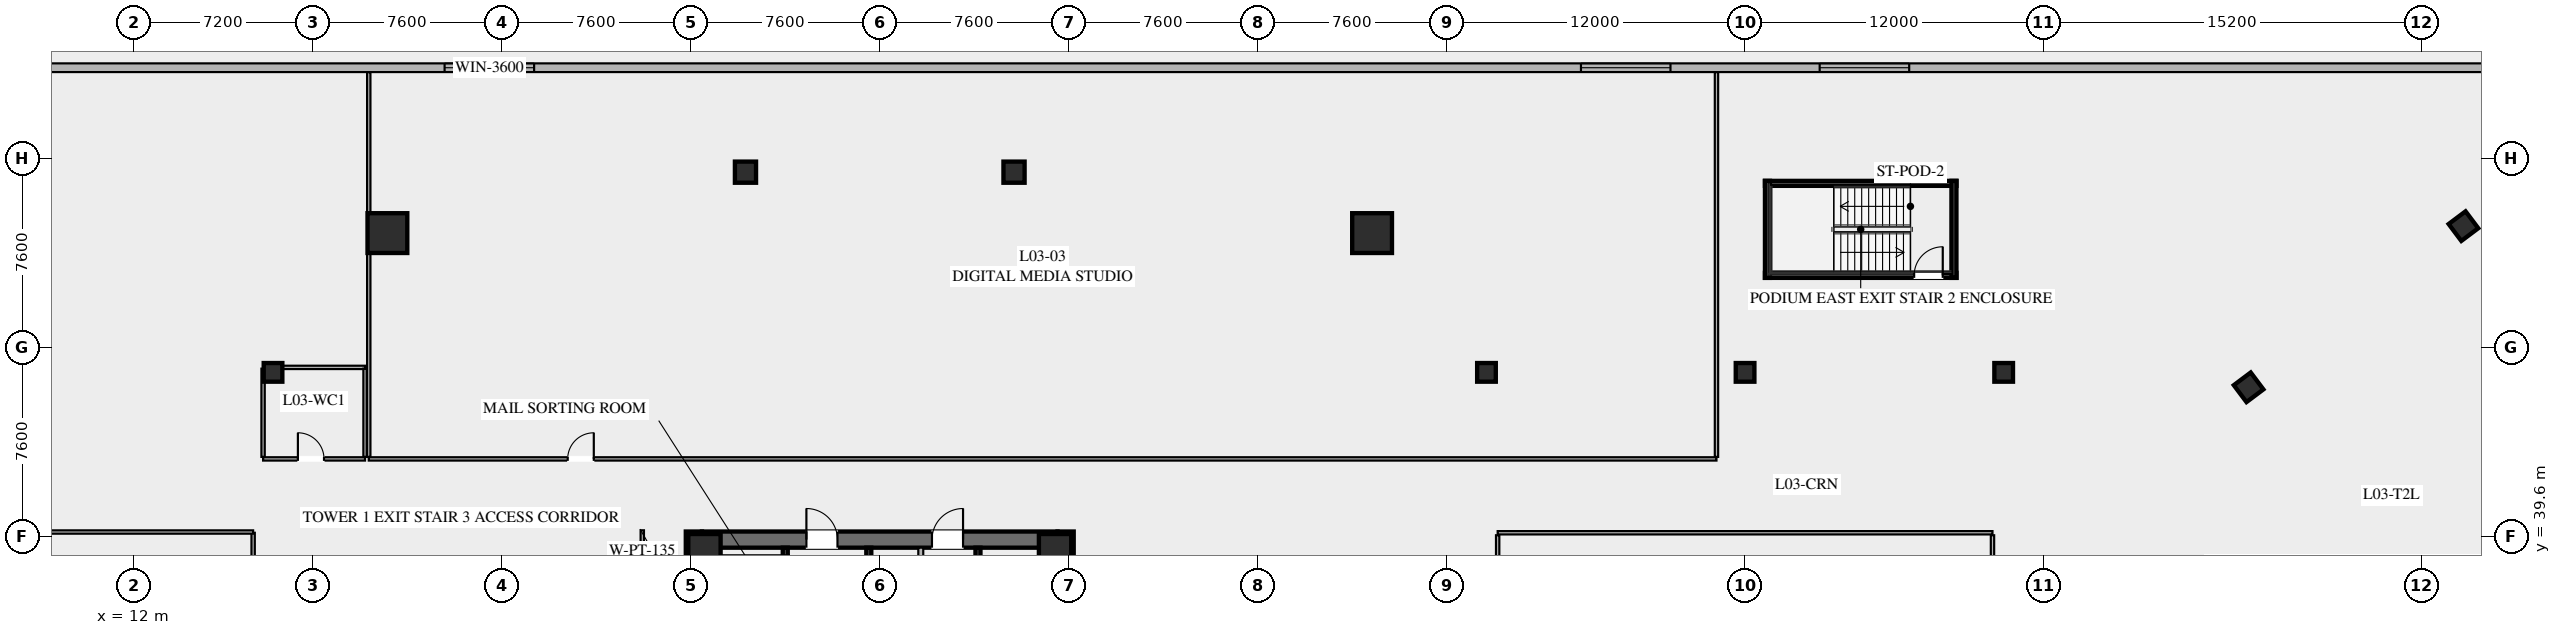
"""IFC4 building model, lengths in metres.
Left out: names, types, materials, properties, quantities, classifications, styles, units other than length and angle.
Written with IfcOpenShell. Run it as: python <this file> out.ifc"""

import sys

from ifc_helpers import new_model, si_unit, direction, frame, frame_2d, origin, origin_2d, place, context, subcontext, project, spatial, rectangle, hollow_rectangle, extrude, element, fill, save


model = new_model("IFC4")
c1 = context("Model", 3, precision=1e-05, world=origin(), true_north=direction((0.0, 1.0)))
c2 = subcontext(c1, "Body", "Model", "MODEL_VIEW")
j1 = project(units=[si_unit("LENGTHUNIT", "METRE"), si_unit("PLANEANGLEUNIT", "RADIAN")], contexts=[c1])
p1 = place(None, origin())
s1 = spatial("IfcSite", under=j1, at=p1, CompositionType="ELEMENT")
p2 = place(p1, origin())
s2 = spatial("IfcBuilding", under=s1, at=p2, CompositionType="ELEMENT")
p3 = place(p2, frame((0.0, 0.0, 15.6)))
s3 = spatial("IfcBuildingStorey", under=s2, at=p3, CompositionType="ELEMENT", Elevation=15.6)
for number, where, z_axis, x_axis in (
    (1, (34.525, 24.2, 0.0), (0.0, 0.0, 1.0), (0.0, 1.0, 0.0)),
    (2, (49.475, 39.8, 0.0), (0.0, 0.0, 1.0), (0.0, -1.0, 0.0)),
):
    element("IfcWall", number, at=place(p3, frame(where, z_axis=z_axis, x_axis=x_axis)), inside=s3, PredefinedType="SHEAR", context=c2, shape_type="SweptSolid", body=[
        extrude(rectangle(XDim=15.6, YDim=0.65, at=frame_2d((7.8, 0.0))), origin(), (0.0, 0.0, 1.0), 4.2),
    ])
p4 = place(p3, frame((34.85, 39.475, 0.0), z_axis=(0.0, 0.0, 1.0), x_axis=(1.0, 0.0, 0.0)))
e3 = element("IfcWall", 3, at=p4, inside=s3, PredefinedType="SHEAR", context=c2, shape_type="SweptSolid", body=[
    extrude(rectangle(XDim=14.3, YDim=0.65, at=frame_2d((7.15, 0.0))), origin(), (0.0, 0.0, 1.0), 4.2),
])
p5 = place(p4, frame((4.2, 0.0, 0.0)))
e4 = element("IfcOpeningElement", 4, at=p5, cuts=e3, PredefinedType="OPENING", context=c2, shape_type="SweptSolid", body=[
    extrude(rectangle(XDim=1.25, YDim=2.25, at=frame_2d((0.625, 1.125))), frame((0.0, 0.335, 0.0), z_axis=(0.0, -1.0, 0.0), x_axis=(1.0, 0.0, 0.0)), (0.0, 0.0, 1.0), 0.67),
])
p6 = place(p4, frame((9.25, 0.0, 0.0)))
e5 = element("IfcOpeningElement", 5, at=p6, cuts=e3, PredefinedType="OPENING", context=c2, shape_type="SweptSolid", body=[
    extrude(rectangle(XDim=1.25, YDim=2.25, at=frame_2d((0.625, 1.125))), frame((0.0, 0.335, 0.0), z_axis=(0.0, -1.0, 0.0), x_axis=(1.0, 0.0, 0.0)), (0.0, 0.0, 1.0), 0.67),
])
for number, where, z_axis, x_axis in (
    (6, (49.05, 39.05, 0.0), (0.0, 0.0, 1.0), (1.0, 0.0, 0.0)),
    (7, (34.95, 39.05, 0.0), (0.0, 0.0, 1.0), (1.0, 0.0, 0.0)),
):
    element("IfcColumn", number, at=place(p3, frame(where, z_axis=z_axis, x_axis=x_axis)), inside=s3, PredefinedType="COLUMN", context=c2, shape_type="SweptSolid", body=[
        extrude(hollow_rectangle(XDim=1.3, YDim=1.3, WallThickness=0.05, at=origin_2d()), origin(), (0.0, 0.0, 1.0), 3.9),
    ])
for number, where, z_axis, x_axis in (
    (8, (61.8, 51.8, 0.0), (0.0, 0.0, 1.0), (1.0, 0.0, 0.0)),
    (9, (22.2, 51.8, 0.0), (0.0, 0.0, 1.0), (1.0, 0.0, 0.0)),
):
    element("IfcColumn", number, at=place(p3, frame(where, z_axis=z_axis, x_axis=x_axis)), inside=s3, PredefinedType="COLUMN", context=c2, shape_type="SweptSolid", body=[
        extrude(hollow_rectangle(XDim=1.6, YDim=1.6, WallThickness=0.06, at=origin_2d()), origin(), (0.0, 0.0, 1.0), 3.9),
    ])
for number, where, z_axis, x_axis in (
    (10, (47.4, 54.25, 0.0), (0.0, 0.0, 1.0), (1.0, 0.0, 0.0)),
    (11, (36.6, 54.25, 0.0), (0.0, 0.0, 1.0), (1.0, 0.0, 0.0)),
):
    element("IfcColumn", number, at=place(p3, frame(where, z_axis=z_axis, x_axis=x_axis)), inside=s3, PredefinedType="COLUMN", context=c2, shape_type="SweptSolid", body=[
        extrude(hollow_rectangle(XDim=0.85, YDim=0.85, WallThickness=0.035, at=origin_2d()), origin(), (0.0, 0.0, 1.0), 3.9),
    ])
p7 = place(p3, frame((103.571, 33.522, 0.0), z_axis=(0.0, 0.0, 1.0), x_axis=(0.799998028465, 0.600002628705, 0.0)))
e12 = element("IfcWall", 12, at=p7, inside=s3, PredefinedType="SHEAR", context=c2, shape_type="SweptSolid", body=[
    extrude(rectangle(XDim=14.86, YDim=0.65, at=frame_2d((7.43, 0.0))), origin(), (0.0, 0.0, 1.0), 4.2),
])
p8 = place(p7, frame((4.48, 0.0, 0.0)))
e13 = element("IfcOpeningElement", 13, at=p8, cuts=e12, PredefinedType="OPENING", context=c2, shape_type="SweptSolid", body=[
    extrude(rectangle(XDim=1.25, YDim=2.25, at=frame_2d((0.625, 1.125))), frame((0.0, 0.335, 0.0), z_axis=(0.0, -1.0, 0.0), x_axis=(1.0, 0.0, 0.0)), (0.0, 0.0, 1.0), 0.67),
])
p9 = place(p7, frame((9.53, 0.0, 0.0)))
e14 = element("IfcOpeningElement", 14, at=p9, cuts=e12, PredefinedType="OPENING", context=c2, shape_type="SweptSolid", body=[
    extrude(rectangle(XDim=1.25, YDim=2.25, at=frame_2d((0.625, 1.125))), frame((0.0, 0.335, 0.0), z_axis=(0.0, -1.0, 0.0), x_axis=(1.0, 0.0, 0.0)), (0.0, 0.0, 1.0), 0.67),
])
for number, where, z_axis, x_axis in (
    (15, (105.69, 52.08, 0.0), (0.0, 0.0, 1.0), (0.8, 0.6, 0.0)),
    (16, (97.05, 45.6, 0.0), (0.0, 0.0, 1.0), (0.8, 0.6, 0.0)),
):
    element("IfcColumn", number, at=place(p3, frame(where, z_axis=z_axis, x_axis=x_axis)), inside=s3, PredefinedType="COLUMN", context=c2, shape_type="SweptSolid", body=[
        extrude(hollow_rectangle(XDim=0.85, YDim=0.85, WallThickness=0.035, at=origin_2d()), origin(), (0.0, 0.0, 1.0), 3.9),
    ])
for number, where, z_axis, x_axis in (
    (17, (17.6, 46.2, 0.0), (0.0, 0.0, 1.0), (1.0, 0.0, 0.0)),
    (18, (66.4, 46.2, 0.0), (0.0, 0.0, 1.0), (1.0, 0.0, 0.0)),
    (19, (76.8, 46.2, 0.0), (0.0, 0.0, 1.0), (1.0, 0.0, 0.0)),
    (20, (87.2, 46.2, 0.0), (0.0, 0.0, 1.0), (1.0, 0.0, 0.0)),
):
    element("IfcColumn", number, at=place(p3, frame(where, z_axis=z_axis, x_axis=x_axis)), inside=s3, PredefinedType="COLUMN", context=c2, shape_type="SweptSolid", body=[
        extrude(rectangle(XDim=0.75, YDim=0.75, at=origin_2d()), origin(), (0.0, 0.0, 1.0), 3.9),
    ])
p10 = place(p3, frame((5.55, 58.45, 0.0), z_axis=(0.0, 0.0, 1.0), x_axis=(1.0, 0.0, 0.0)))
e21 = element("IfcWall", 21, at=p10, inside=s3, PredefinedType="SOLIDWALL", context=c2, shape_type="SweptSolid", body=[
    extrude(rectangle(XDim=138.275, YDim=0.35, at=frame_2d((69.137, 0.0))), origin(), (0.0, 0.0, 1.0), 3.9),
])
p11 = place(p10, frame((18.95, 0.0, 0.95)))
e22 = element("IfcOpeningElement", 22, at=p11, cuts=e21, PredefinedType="OPENING", context=c2, shape_type="SweptSolid", body=[
    extrude(rectangle(XDim=3.6, YDim=1.8, at=frame_2d((1.8, 0.9))), frame((0.0, 0.185, 0.0), z_axis=(0.0, -1.0, 0.0), x_axis=(1.0, 0.0, 0.0)), (0.0, 0.0, 1.0), 0.37),
])
p12 = place(p10, frame((64.65, 0.0, 0.95)))
e23 = element("IfcOpeningElement", 23, at=p12, cuts=e21, PredefinedType="OPENING", context=c2, shape_type="SweptSolid", body=[
    extrude(rectangle(XDim=3.6, YDim=1.8, at=frame_2d((1.8, 0.9))), frame((0.0, 0.185, 0.0), z_axis=(0.0, -1.0, 0.0), x_axis=(1.0, 0.0, 0.0)), (0.0, 0.0, 1.0), 0.37),
])
p13 = place(p10, frame((74.25, 0.0, 0.95)))
e24 = element("IfcOpeningElement", 24, at=p13, cuts=e21, PredefinedType="OPENING", context=c2, shape_type="SweptSolid", body=[
    extrude(rectangle(XDim=3.6, YDim=1.8, at=frame_2d((1.8, 0.9))), frame((0.0, 0.185, 0.0), z_axis=(0.0, -1.0, 0.0), x_axis=(1.0, 0.0, 0.0)), (0.0, 0.0, 1.0), 0.37),
])
p14 = place(p3, frame((38.2, 31.2, 0.0), z_axis=(0.0, 0.0, 1.0), x_axis=(0.0, 1.0, 0.0)))
e25 = element("IfcWall", 25, at=p14, inside=s3, PredefinedType="SHEAR", context=c2, shape_type="SweptSolid", body=[
    extrude(rectangle(XDim=7.95, YDim=0.2, at=frame_2d((3.975, 0.0))), origin(), (0.0, 0.0, 1.0), 3.9),
])
p15 = place(p14, frame((0.45, 0.0, 0.0)))
e26 = element("IfcOpeningElement", 26, at=p15, cuts=e25, PredefinedType="OPENING", context=c2, shape_type="SweptSolid", body=[
    extrude(rectangle(XDim=1.15, YDim=2.2, at=frame_2d((0.575, 1.1))), frame((0.0, 0.11, 0.0), z_axis=(0.0, -1.0, 0.0), x_axis=(1.0, 0.0, 0.0)), (0.0, 0.0, 1.0), 0.22),
])
p16 = place(p3, frame((41.56, 24.85, 0.0), z_axis=(0.0, 0.0, 1.0), x_axis=(0.0, 1.0, 0.0)))
e27 = element("IfcWall", 27, at=p16, inside=s3, PredefinedType="SHEAR", context=c2, shape_type="SweptSolid", body=[
    extrude(rectangle(XDim=14.3, YDim=0.2, at=frame_2d((7.15, 0.0))), origin(), (0.0, 0.0, 1.0), 3.9),
])
p17 = place(p3, frame((45.95, 39.15, 0.0), z_axis=(0.0, 0.0, 1.0), x_axis=(0.0, -1.0, 0.0)))
e28 = element("IfcWall", 28, at=p17, inside=s3, PredefinedType="SHEAR", context=c2, shape_type="SweptSolid", body=[
    extrude(rectangle(XDim=6.35, YDim=0.2, at=frame_2d((3.175, 0.0))), origin(), (0.0, 0.0, 1.0), 3.9),
])
p18 = place(p3, frame((43.65, 32.35, 0.0), z_axis=(0.0, 0.0, 1.0), x_axis=(0.0, 1.0, 0.0)))
e29 = element("IfcWall", 29, at=p18, inside=s3, PredefinedType="SOLIDWALL", context=c2, shape_type="SweptSolid", body=[
    extrude(rectangle(XDim=6.8, YDim=0.2, at=frame_2d((3.4, 0.0))), origin(), (0.0, 0.0, 1.0), 3.9),
])
p19 = place(p3, frame((32.45, 35.4, 0.0), z_axis=(0.0, 0.0, 1.0), x_axis=(0.0, 1.0, 0.0)))
e30 = element("IfcWall", 30, at=p19, inside=s3, PredefinedType="PARTITIONING", context=c2, shape_type="SweptSolid", body=[
    extrude(rectangle(XDim=4.45, YDim=0.135, at=frame_2d((2.225, 0.0))), origin(), (0.0, 0.0, 1.0), 2.943),
])
p20 = place(p3, frame((77.6, 50.1, 0.0), z_axis=(0.0, 0.0, 1.0), x_axis=(1.0, 0.0, 0.0)))
e31 = element("IfcWall", 31, at=p20, inside=s3, PredefinedType="SHEAR", context=c2, shape_type="SweptSolid", body=[
    extrude(rectangle(XDim=7.7, YDim=0.2, at=frame_2d((3.85, 0.0))), origin(), (0.0, 0.0, 1.0), 3.9),
])
p21 = place(p20, frame((6.0, 0.0, 0.0)))
e32 = element("IfcOpeningElement", 32, at=p21, cuts=e31, PredefinedType="OPENING", context=c2, shape_type="SweptSolid", body=[
    extrude(rectangle(XDim=1.15, YDim=2.2, at=frame_2d((0.575, 1.1))), frame((0.0, 0.11, 0.0), z_axis=(0.0, -1.0, 0.0), x_axis=(1.0, 0.0, 0.0)), (0.0, 0.0, 1.0), 0.22),
])
p22 = place(p3, frame((77.6, 53.8, 0.0), z_axis=(0.0, 0.0, 1.0), x_axis=(1.0, 0.0, 0.0)))
e33 = element("IfcWall", 33, at=p22, inside=s3, PredefinedType="SHEAR", context=c2, shape_type="SweptSolid", body=[
    extrude(rectangle(XDim=7.7, YDim=0.2, at=frame_2d((3.85, 0.0))), origin(), (0.0, 0.0, 1.0), 3.9),
])
for number, where, z_axis, x_axis in (
    (34, (77.7, 50.0, 0.0), (0.0, 0.0, 1.0), (0.0, 1.0, 0.0)),
    (35, (85.2, 50.0, 0.0), (0.0, 0.0, 1.0), (0.0, 1.0, 0.0)),
):
    element("IfcWall", number, at=place(p3, frame(where, z_axis=z_axis, x_axis=x_axis)), inside=s3, PredefinedType="SHEAR", context=c2, shape_type="SweptSolid", body=[
        extrude(rectangle(XDim=3.9, YDim=0.2, at=frame_2d((1.95, 0.0))), origin(), (0.0, 0.0, 1.0), 3.9),
    ])
p23 = place(p3, frame((16.8, 24.35, 0.0), z_axis=(0.0, 0.0, 1.0), x_axis=(0.0, 1.0, 0.0)))
e36 = element("IfcWall", 36, at=p23, inside=s3, PredefinedType="PARTITIONING", context=c2, shape_type="SweptSolid", body=[
    extrude(rectangle(XDim=15.4, YDim=0.135, at=frame_2d((7.7, 0.0))), origin(), (0.0, 0.0, 1.0), 2.943),
])
p24 = place(p3, frame((5.55, 39.78, 0.0), z_axis=(0.0, 0.0, 1.0), x_axis=(1.0, 0.0, 0.0)))
e37 = element("IfcWall", 37, at=p24, inside=s3, PredefinedType="PARTITIONING", context=c2, shape_type="SweptSolid", body=[
    extrude(rectangle(XDim=11.25, YDim=0.135, at=frame_2d((5.625, 0.0))), origin(), (0.0, 0.0, 1.0), 2.943),
])
for number, where, z_axis, x_axis in (
    (38, (66.85, 24.35, 0.0), (0.0, 0.0, 1.0), (0.0, 1.0, 0.0)),
    (39, (86.75, 24.35, 0.0), (0.0, 0.0, 1.0), (0.0, 1.0, 0.0)),
):
    element("IfcWall", number, at=place(p3, frame(where, z_axis=z_axis, x_axis=x_axis)), inside=s3, PredefinedType="PARTITIONING", context=c2, shape_type="SweptSolid", body=[
        extrude(rectangle(XDim=15.3, YDim=0.135, at=frame_2d((7.65, 0.0))), origin(), (0.0, 0.0, 1.0), 2.943),
    ])
p25 = place(p3, frame((66.85, 39.75, 0.0), z_axis=(0.0, 0.0, 1.0), x_axis=(1.0, 0.0, 0.0)))
e40 = element("IfcWall", 40, at=p25, inside=s3, PredefinedType="PARTITIONING", context=c2, shape_type="SweptSolid", body=[
    extrude(rectangle(XDim=19.9, YDim=0.135, at=frame_2d((9.95, 0.0))), origin(), (0.0, 0.0, 1.0), 2.943),
])
p26 = place(p3, frame((21.45, 42.72, 0.0), z_axis=(0.0, 0.0, 1.0), x_axis=(1.0, 0.0, 0.0)))
e41 = element("IfcWall", 41, at=p26, inside=s3, PredefinedType="PARTITIONING", context=c2, shape_type="SweptSolid", body=[
    extrude(rectangle(XDim=54.2, YDim=0.135, at=frame_2d((27.1, 0.0))), origin(), (0.0, 0.0, 1.0), 2.943),
])
p27 = place(p26, frame((8.0, 0.0, 0.0)))
e42 = element("IfcOpeningElement", 42, at=p27, cuts=e41, PredefinedType="OPENING", context=c2, shape_type="SweptSolid", body=[
    extrude(rectangle(XDim=1.05, YDim=2.2, at=frame_2d((0.525, 1.1))), frame((0.0, 0.077, 0.0), z_axis=(0.0, -1.0, 0.0), x_axis=(1.0, 0.0, 0.0)), (0.0, 0.0, 1.0), 0.155),
])
for number, where, z_axis, x_axis in (
    (43, (21.45, 42.8, 0.0), (0.0, 0.0, 1.0), (0.0, 1.0, 0.0)),
    (44, (75.65, 42.8, 0.0), (0.0, 0.0, 1.0), (0.0, 1.0, 0.0)),
):
    element("IfcWall", number, at=place(p3, frame(where, z_axis=z_axis, x_axis=x_axis)), inside=s3, PredefinedType="PARTITIONING", context=c2, shape_type="SweptSolid", body=[
        extrude(rectangle(XDim=15.47, YDim=0.135, at=frame_2d((7.735, 0.0))), origin(), (0.0, 0.0, 1.0), 2.943),
    ])
p28 = place(p3, frame((17.2, 42.72, 0.0), z_axis=(0.0, 0.0, 1.0), x_axis=(1.0, 0.0, 0.0)))
e45 = element("IfcWall", 45, at=p28, inside=s3, PredefinedType="PARTITIONING", context=c2, shape_type="SweptSolid", body=[
    extrude(rectangle(XDim=4.1, YDim=0.135, at=frame_2d((2.05, 0.0))), origin(), (0.0, 0.0, 1.0), 2.943),
])
p29 = place(p28, frame((1.4, 0.0, 0.0)))
e46 = element("IfcOpeningElement", 46, at=p29, cuts=e45, PredefinedType="OPENING", context=c2, shape_type="SweptSolid", body=[
    extrude(rectangle(XDim=1.05, YDim=2.2, at=frame_2d((0.525, 1.1))), frame((0.0, 0.077, 0.0), z_axis=(0.0, -1.0, 0.0), x_axis=(1.0, 0.0, 0.0)), (0.0, 0.0, 1.0), 0.155),
])
p30 = place(p3, frame((17.2, 46.4, 0.0), z_axis=(0.0, 0.0, 1.0), x_axis=(1.0, 0.0, 0.0)))
e47 = element("IfcWall", 47, at=p30, inside=s3, PredefinedType="PARTITIONING", context=c2, shape_type="SweptSolid", body=[
    extrude(rectangle(XDim=4.1, YDim=0.135, at=frame_2d((2.05, 0.0))), origin(), (0.0, 0.0, 1.0), 2.943),
])
for number, where, z_axis, x_axis in (
    (48, (17.2, 42.8, 0.0), (0.0, 0.0, 1.0), (0.0, 1.0, 0.0)),
    (49, (21.3, 42.8, 0.0), (0.0, 0.0, 1.0), (0.0, 1.0, 0.0)),
):
    element("IfcWall", number, at=place(p3, frame(where, z_axis=z_axis, x_axis=x_axis)), inside=s3, PredefinedType="PARTITIONING", context=c2, shape_type="SweptSolid", body=[
        extrude(rectangle(XDim=3.55, YDim=0.135, at=frame_2d((1.775, 0.0))), origin(), (0.0, 0.0, 1.0), 2.943),
    ])
p31 = place(p11, origin())
e50 = element("IfcWindow", 50, at=p31, inside=s3, PartitioningType="SINGLE_PANEL", PredefinedType="WINDOW", context=c2, shape_type="SweptSolid", body=[
    extrude(rectangle(XDim=3.6, YDim=1.8, at=frame_2d((1.8, 0.9))), frame((0.0, 0.03, 0.0), z_axis=(0.0, -1.0, 0.0), x_axis=(1.0, 0.0, 0.0)), (0.0, 0.0, 1.0), 0.06),
])
fill(e22, e50)
p32 = place(p12, origin())
e51 = element("IfcWindow", 51, at=p32, inside=s3, PartitioningType="SINGLE_PANEL", PredefinedType="WINDOW", context=c2, shape_type="SweptSolid", body=[
    extrude(rectangle(XDim=3.6, YDim=1.8, at=frame_2d((1.8, 0.9))), frame((0.0, 0.03, 0.0), z_axis=(0.0, -1.0, 0.0), x_axis=(1.0, 0.0, 0.0)), (0.0, 0.0, 1.0), 0.06),
])
fill(e23, e51)
p33 = place(p13, origin())
e52 = element("IfcWindow", 52, at=p33, inside=s3, PartitioningType="SINGLE_PANEL", PredefinedType="WINDOW", context=c2, shape_type="SweptSolid", body=[
    extrude(rectangle(XDim=3.6, YDim=1.8, at=frame_2d((1.8, 0.9))), frame((0.0, 0.03, 0.0), z_axis=(0.0, -1.0, 0.0), x_axis=(1.0, 0.0, 0.0)), (0.0, 0.0, 1.0), 0.06),
])
fill(e24, e52)
p34 = place(p5, origin())
e53 = element("IfcDoor", 53, at=p34, inside=s3, OperationType="SINGLE_SWING_LEFT", PredefinedType="DOOR", context=c2, shape_type="SweptSolid", body=[
    extrude(rectangle(XDim=1.25, YDim=2.25, at=frame_2d((0.625, 1.125))), frame((0.0, 0.025, 0.0), z_axis=(0.0, -1.0, 0.0), x_axis=(1.0, 0.0, 0.0)), (0.0, 0.0, 1.0), 0.05),
])
fill(e4, e53)
p35 = place(p6, origin())
e54 = element("IfcDoor", 54, at=p35, inside=s3, OperationType="SINGLE_SWING_RIGHT", PredefinedType="DOOR", context=c2, shape_type="SweptSolid", body=[
    extrude(rectangle(XDim=1.25, YDim=2.25, at=frame_2d((0.625, 1.125))), frame((0.0, 0.025, 0.0), z_axis=(0.0, -1.0, 0.0), x_axis=(1.0, 0.0, 0.0)), (0.0, 0.0, 1.0), 0.05),
])
fill(e5, e54)
p36 = place(p21, origin())
e55 = element("IfcDoor", 55, at=p36, inside=s3, OperationType="SINGLE_SWING_RIGHT", PredefinedType="DOOR", context=c2, shape_type="SweptSolid", body=[
    extrude(rectangle(XDim=1.15, YDim=2.2, at=frame_2d((0.575, 1.1))), frame((0.0, 0.025, 0.0), z_axis=(0.0, -1.0, 0.0), x_axis=(1.0, 0.0, 0.0)), (0.0, 0.0, 1.0), 0.05),
])
fill(e32, e55)
p37 = place(p27, origin())
e56 = element("IfcDoor", 56, at=p37, inside=s3, OperationType="SINGLE_SWING_RIGHT", PredefinedType="DOOR", context=c2, shape_type="SweptSolid", body=[
    extrude(rectangle(XDim=1.05, YDim=2.2, at=frame_2d((0.525, 1.1))), frame((0.0, 0.025, 0.0), z_axis=(0.0, -1.0, 0.0), x_axis=(1.0, 0.0, 0.0)), (0.0, 0.0, 1.0), 0.05),
])
fill(e42, e56)
p38 = place(p29, origin())
e57 = element("IfcDoor", 57, at=p38, inside=s3, OperationType="SINGLE_SWING_LEFT", PredefinedType="DOOR", context=c2, shape_type="SweptSolid", body=[
    extrude(rectangle(XDim=1.05, YDim=2.2, at=frame_2d((0.525, 1.1))), frame((0.0, 0.025, 0.0), z_axis=(0.0, -1.0, 0.0), x_axis=(1.0, 0.0, 0.0)), (0.0, 0.0, 1.0), 0.05),
])
fill(e46, e57)
save(model, sys.argv[1])
